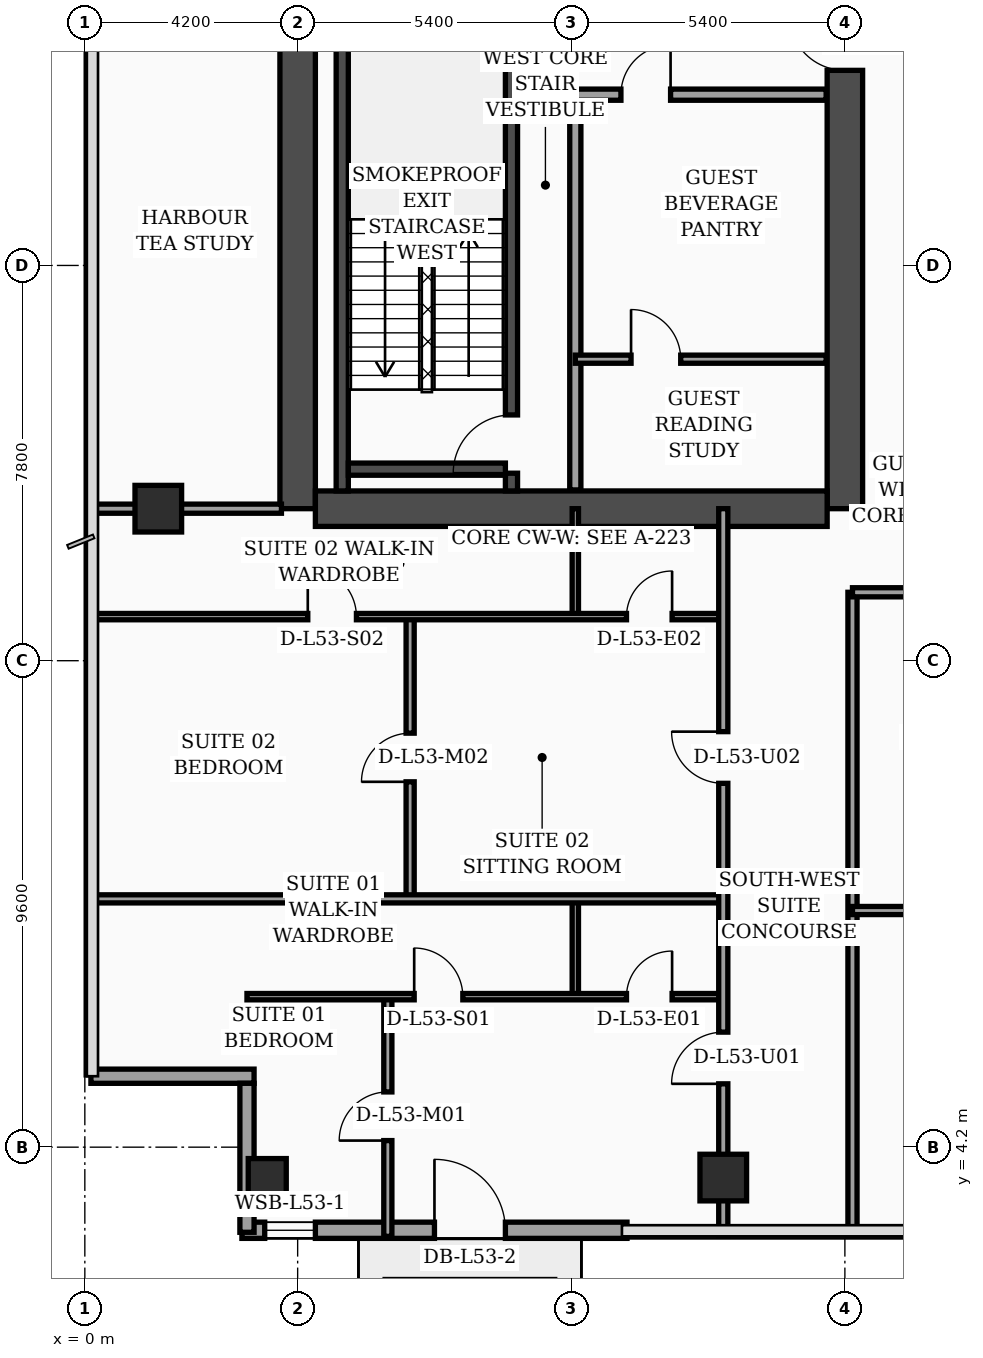
"""IFC4 building model, lengths in metres.
Left out: names, types, materials, properties, quantities, classifications, styles, units other than length and angle.
Written with IfcOpenShell. Run it as: python <this file> out.ifc"""

import sys

from ifc_helpers import new_model, si_unit, direction, frame, frame_2d, origin, origin_2d, place, context, subcontext, project, spatial, rectangle, hollow_rectangle, extrude, element, fill, save


model = new_model("IFC4")
c1 = context("Model", 3, precision=1e-05, world=origin(), true_north=direction((0.0, 1.0)))
c2 = subcontext(c1, "Body", "Model", "MODEL_VIEW")
j1 = project(units=[si_unit("LENGTHUNIT", "METRE"), si_unit("PLANEANGLEUNIT", "RADIAN")], contexts=[c1])
p1 = place(None, origin())
s1 = spatial("IfcSite", under=j1, at=p1, CompositionType="ELEMENT")
p2 = place(p1, origin())
s2 = spatial("IfcBuilding", under=s1, at=p2, CompositionType="ELEMENT")
p3 = place(p2, frame((0.0, 0.0, 214.8)))
s3 = spatial("IfcBuildingStorey", under=s2, at=p3, CompositionType="ELEMENT", Elevation=214.8)
p4 = place(p3, frame((4.2, 16.8, 0.0), z_axis=(0.0, 0.0, 1.0), x_axis=(0.0, 1.0, 0.0)))
e1 = element("IfcWall", 1, at=p4, inside=s3, PredefinedType="SHEAR", context=c2, shape_type="SweptSolid", body=[
    extrude(rectangle(XDim=21.6, YDim=0.7, at=frame_2d((10.8, 0.0))), origin(), (0.0, 0.0, 1.0), 4.05),
])
p5 = place(p3, frame((15.0, 16.8, 0.0), z_axis=(0.0, 0.0, 1.0), x_axis=(0.0, 1.0, 0.0)))
e2 = element("IfcWall", 2, at=p5, inside=s3, PredefinedType="SHEAR", context=c2, shape_type="SweptSolid", body=[
    extrude(rectangle(XDim=21.6, YDim=0.7, at=frame_2d((10.8, 0.0))), origin(), (0.0, 0.0, 1.0), 4.05),
])
p6 = place(p5, frame((8.65, 0.0, 0.0)))
e3 = element("IfcOpeningElement", 3, at=p6, cuts=e2, PredefinedType="OPENING", context=c2, shape_type="SweptSolid", body=[
    extrude(rectangle(XDim=1.1, YDim=2.2, at=frame_2d((0.55, 1.1))), frame((0.0, 0.36, 0.0), z_axis=(0.0, -1.0, 0.0), x_axis=(1.0, 0.0, 0.0)), (0.0, 0.0, 1.0), 0.72),
])
p7 = place(p5, frame((10.85, 0.0, 0.0)))
e4 = element("IfcOpeningElement", 4, at=p7, cuts=e2, PredefinedType="OPENING", context=c2, shape_type="SweptSolid", body=[
    extrude(rectangle(XDim=1.1, YDim=2.2, at=frame_2d((0.55, 1.1))), frame((0.0, 0.36, 0.0), z_axis=(0.0, -1.0, 0.0), x_axis=(1.0, 0.0, 0.0)), (0.0, 0.0, 1.0), 0.72),
])
p8 = place(p5, frame((13.5, 0.0, 0.0)))
e5 = element("IfcOpeningElement", 5, at=p8, cuts=e2, PredefinedType="OPENING", context=c2, shape_type="SweptSolid", body=[
    extrude(rectangle(XDim=1.1, YDim=2.2, at=frame_2d((0.55, 1.1))), frame((0.0, 0.36, 0.0), z_axis=(0.0, -1.0, 0.0), x_axis=(1.0, 0.0, 0.0)), (0.0, 0.0, 1.0), 0.72),
])
p9 = place(p5, frame((16.15, 0.0, 0.0)))
e6 = element("IfcOpeningElement", 6, at=p9, cuts=e2, PredefinedType="OPENING", context=c2, shape_type="SweptSolid", body=[
    extrude(rectangle(XDim=1.1, YDim=2.2, at=frame_2d((0.55, 1.1))), frame((0.0, 0.36, 0.0), z_axis=(0.0, -1.0, 0.0), x_axis=(1.0, 0.0, 0.0)), (0.0, 0.0, 1.0), 0.72),
])
p10 = place(p3, frame((4.55, 16.8, 0.0), z_axis=(0.0, 0.0, 1.0), x_axis=(1.0, 0.0, 0.0)))
e7 = element("IfcWall", 7, at=p10, inside=s3, PredefinedType="SHEAR", context=c2, shape_type="SweptSolid", body=[
    extrude(rectangle(XDim=10.1, YDim=0.7, at=frame_2d((5.05, 0.0))), origin(), (0.0, 0.0, 1.0), 4.05),
])
p11 = place(p3, frame((5.08, 17.15, 0.0), z_axis=(0.0, 0.0, 1.0), x_axis=(0.0, 1.0, 0.0)))
e8 = element("IfcWall", 8, at=p11, inside=s3, PredefinedType="SOLIDWALL", context=c2, shape_type="SweptSolid", body=[
    extrude(rectangle(XDim=9.64, YDim=0.24, at=frame_2d((4.82, 0.0))), origin(), (0.0, 0.0, 1.0), 4.05),
])
p12 = place(p3, frame((8.42, 17.15, 0.0), z_axis=(0.0, 0.0, 1.0), x_axis=(0.0, 1.0, 0.0)))
e9 = element("IfcWall", 9, at=p12, inside=s3, PredefinedType="SOLIDWALL", context=c2, shape_type="SweptSolid", body=[
    extrude(rectangle(XDim=9.64, YDim=0.24, at=frame_2d((4.82, 0.0))), origin(), (0.0, 0.0, 1.0), 4.05),
])
p13 = place(p12, frame((0.35, 0.0, 0.0)))
e10 = element("IfcOpeningElement", 10, at=p13, cuts=e9, PredefinedType="OPENING", context=c2, shape_type="SweptSolid", body=[
    extrude(rectangle(XDim=1.15, YDim=2.2, at=frame_2d((0.575, 1.1))), frame((0.0, 0.13, 0.0), z_axis=(0.0, -1.0, 0.0), x_axis=(1.0, 0.0, 0.0)), (0.0, 0.0, 1.0), 0.26),
])
p14 = place(p3, frame((5.2, 17.58, 0.0), z_axis=(0.0, 0.0, 1.0), x_axis=(1.0, 0.0, 0.0)))
e11 = element("IfcWall", 11, at=p14, inside=s3, PredefinedType="SOLIDWALL", context=c2, shape_type="SweptSolid", body=[
    extrude(rectangle(XDim=3.1, YDim=0.24, at=frame_2d((1.55, 0.0))), origin(), (0.0, 0.0, 1.0), 4.05),
])
p15 = place(p3, frame((3.6, 3.6, 0.0), z_axis=(0.0, 0.0, 1.0), x_axis=(1.0, 0.0, 0.0)))
e12 = element("IfcColumn", 12, at=p15, inside=s3, PredefinedType="COLUMN", context=c2, shape_type="SweptSolid", body=[
    extrude(hollow_rectangle(XDim=0.75, YDim=0.75, WallThickness=0.032, at=origin_2d()), origin(), (0.0, 0.0, 1.0), 4.05),
])
for number, where, z_axis, x_axis in (
    (13, (1.45, 16.8, 0.0), (0.0, 0.0, 1.0), (1.0, 0.0, 0.0)),
    (14, (12.6, 3.6, 0.0), (0.0, 0.0, 1.0), (1.0, 0.0, 0.0)),
):
    element("IfcColumn", number, at=place(p3, frame(where, z_axis=z_axis, x_axis=x_axis)), inside=s3, PredefinedType="COLUMN", context=c2, shape_type="SweptSolid", body=[
        extrude(rectangle(XDim=0.92, YDim=0.92, at=origin_2d()), origin(), (0.0, 0.0, 1.0), 4.05),
    ])
p16 = place(p3, frame((3.1, 2.56, 0.0), z_axis=(0.0, 0.0, 1.0), x_axis=(1.0, 0.0, 0.0)))
e15 = element("IfcWall", 15, at=p16, inside=s3, PredefinedType="SOLIDWALL", context=c2, shape_type="SweptSolid", body=[
    extrude(rectangle(XDim=7.6, YDim=0.32, at=frame_2d((3.8, 0.0))), origin(), (0.0, 0.0, 1.0), 4.05),
])
p17 = place(p16, frame((0.45, 0.0, 0.75)))
e16 = element("IfcOpeningElement", 16, at=p17, cuts=e15, PredefinedType="OPENING", context=c2, shape_type="SweptSolid", body=[
    extrude(rectangle(XDim=1.0, YDim=1.6, at=frame_2d((0.5, 0.8))), frame((0.0, 0.17, 0.0), z_axis=(0.0, -1.0, 0.0), x_axis=(1.0, 0.0, 0.0)), (0.0, 0.0, 1.0), 0.34),
])
p18 = place(p16, frame((3.8, 0.0, 0.0)))
e17 = element("IfcOpeningElement", 17, at=p18, cuts=e15, PredefinedType="OPENING", context=c2, shape_type="SweptSolid", body=[
    extrude(rectangle(XDim=1.4, YDim=2.25, at=frame_2d((0.7, 1.125))), frame((0.0, 0.17, 0.0), z_axis=(0.0, -1.0, 0.0), x_axis=(1.0, 0.0, 0.0)), (0.0, 0.0, 1.0), 0.34),
])
p19 = place(p3, frame((0.12, 5.6, 0.0), z_axis=(0.0, 0.0, 1.0), x_axis=(1.0, 0.0, 0.0)))
e18 = element("IfcWall", 18, at=p19, inside=s3, PredefinedType="SOLIDWALL", context=c2, shape_type="SweptSolid", body=[
    extrude(rectangle(XDim=3.22, YDim=0.28, at=frame_2d((1.61, 0.0))), origin(), (0.0, 0.0, 1.0), 3.45),
])
p20 = place(p3, frame((3.2, 5.46, 0.0), z_axis=(0.0, 0.0, 1.0), x_axis=(0.0, -1.0, 0.0)))
e19 = element("IfcWall", 19, at=p20, inside=s3, PredefinedType="SOLIDWALL", context=c2, shape_type="SweptSolid", body=[
    extrude(rectangle(XDim=2.94, YDim=0.28, at=frame_2d((1.47, 0.0))), origin(), (0.0, 0.0, 1.0), 2.35),
])
p21 = place(p3, frame((9.68, 17.17, 0.0), z_axis=(0.0, 0.0, 1.0), x_axis=(0.0, 1.0, 0.0)))
e20 = element("IfcWall", 20, at=p21, inside=s3, PredefinedType="SOLIDWALL", context=c2, shape_type="SweptSolid", body=[
    extrude(rectangle(XDim=7.83, YDim=0.22, at=frame_2d((3.915, 0.0))), origin(), (0.0, 0.0, 1.0), 4.05),
])
p22 = place(p3, frame((9.68, 19.75, 0.0), z_axis=(0.0, 0.0, 1.0), x_axis=(1.0, 0.0, 0.0)))
e21 = element("IfcWall", 21, at=p22, inside=s3, PredefinedType="PARTITIONING", context=c2, shape_type="SweptSolid", body=[
    extrude(rectangle(XDim=4.95, YDim=0.16, at=frame_2d((2.475, 0.0))), origin(), (0.0, 0.0, 1.0), 4.05),
])
p23 = place(p22, frame((1.1, 0.0, 0.0)))
e22 = element("IfcOpeningElement", 22, at=p23, cuts=e21, PredefinedType="OPENING", context=c2, shape_type="SweptSolid", body=[
    extrude(rectangle(XDim=0.98, YDim=2.15, at=frame_2d((0.49, 1.075))), frame((0.0, 0.09, 0.0), z_axis=(0.0, -1.0, 0.0), x_axis=(1.0, 0.0, 0.0)), (0.0, 0.0, 1.0), 0.18),
])
p24 = place(p3, frame((9.68, 24.97, 0.0), z_axis=(0.0, 0.0, 1.0), x_axis=(1.0, 0.0, 0.0)))
e23 = element("IfcWall", 23, at=p24, inside=s3, PredefinedType="SOLIDWALL", context=c2, shape_type="SweptSolid", body=[
    extrude(rectangle(XDim=4.95, YDim=0.22, at=frame_2d((2.475, 0.0))), origin(), (0.0, 0.0, 1.0), 3.45),
])
p25 = place(p24, frame((0.9, 0.0, 0.0)))
e24 = element("IfcOpeningElement", 24, at=p25, cuts=e23, PredefinedType="OPENING", context=c2, shape_type="SweptSolid", body=[
    extrude(rectangle(XDim=0.98, YDim=2.15, at=frame_2d((0.49, 1.075))), frame((0.0, 0.12, 0.0), z_axis=(0.0, -1.0, 0.0), x_axis=(1.0, 0.0, 0.0)), (0.0, 0.0, 1.0), 0.24),
])
p26 = place(p3, frame((0.08, 16.8, 0.0), z_axis=(0.0, 0.0, 1.0), x_axis=(1.0, 0.0, 0.0)))
e25 = element("IfcWall", 25, at=p26, inside=s3, PredefinedType="PARTITIONING", context=c2, shape_type="SweptSolid", body=[
    extrude(rectangle(XDim=3.8, YDim=0.18, at=frame_2d((1.9, 0.0))), origin(), (0.0, 0.0, 1.0), 3.45),
])
p27 = place(p3, frame((9.68, 7.17, 0.0), z_axis=(0.0, 0.0, 1.0), x_axis=(0.0, 1.0, 0.0)))
e26 = element("IfcWall", 26, at=p27, inside=s3, PredefinedType="PARTITIONING", context=c2, shape_type="SweptSolid", body=[
    extrude(rectangle(XDim=1.93, YDim=0.125, at=frame_2d((0.965, 0.0))), origin(), (0.0, 0.0, 1.0), 3.6),
])
p28 = place(p3, frame((5.98, 2.44, 0.0), z_axis=(0.0, 0.0, 1.0), x_axis=(0.0, 1.0, 0.0)))
e27 = element("IfcWall", 27, at=p28, inside=s3, PredefinedType="PARTITIONING", context=c2, shape_type="SweptSolid", body=[
    extrude(rectangle(XDim=4.73, YDim=0.16, at=frame_2d((2.365, 0.0))), origin(), (0.0, 0.0, 1.0), 2.35),
])
p29 = place(p28, frame((1.89, 0.0, 0.0)))
e28 = element("IfcOpeningElement", 28, at=p29, cuts=e27, PredefinedType="OPENING", context=c2, shape_type="SweptSolid", body=[
    extrude(rectangle(XDim=0.96, YDim=2.2, at=frame_2d((0.48, 1.1))), frame((0.0, 0.09, 0.0), z_axis=(0.0, -1.0, 0.0), x_axis=(1.0, 0.0, 0.0)), (0.0, 0.0, 1.0), 0.18),
])
p30 = place(p3, frame((3.2, 7.17, 0.0), z_axis=(0.0, 0.0, 1.0), x_axis=(1.0, 0.0, 0.0)))
e29 = element("IfcWall", 29, at=p30, inside=s3, PredefinedType="PARTITIONING", context=c2, shape_type="SweptSolid", body=[
    extrude(rectangle(XDim=9.4, YDim=0.125, at=frame_2d((4.7, 0.0))), origin(), (0.0, 0.0, 1.0), 3.45),
])
p31 = place(p30, frame((3.3, 0.0, 0.0)))
e30 = element("IfcOpeningElement", 30, at=p31, cuts=e29, PredefinedType="OPENING", context=c2, shape_type="SweptSolid", body=[
    extrude(rectangle(XDim=0.96, YDim=2.2, at=frame_2d((0.48, 1.1))), frame((0.0, 0.073, 0.0), z_axis=(0.0, -1.0, 0.0), x_axis=(1.0, 0.0, 0.0)), (0.0, 0.0, 1.0), 0.145),
])
p32 = place(p30, frame((7.49, 0.0, 0.0)))
e31 = element("IfcOpeningElement", 31, at=p32, cuts=e29, PredefinedType="OPENING", context=c2, shape_type="SweptSolid", body=[
    extrude(rectangle(XDim=0.9, YDim=2.15, at=frame_2d((0.45, 1.075))), frame((0.0, 0.073, 0.0), z_axis=(0.0, -1.0, 0.0), x_axis=(1.0, 0.0, 0.0)), (0.0, 0.0, 1.0), 0.145),
])
p33 = place(p3, frame((9.68, 14.67, 0.0), z_axis=(0.0, 0.0, 1.0), x_axis=(0.0, 1.0, 0.0)))
e32 = element("IfcWall", 32, at=p33, inside=s3, PredefinedType="PARTITIONING", context=c2, shape_type="SweptSolid", body=[
    extrude(rectangle(XDim=2.13, YDim=0.125, at=frame_2d((1.065, 0.0))), origin(), (0.0, 0.0, 1.0), 4.05),
])
p34 = place(p3, frame((6.42, 9.1, 0.0), z_axis=(0.0, 0.0, 1.0), x_axis=(0.0, 1.0, 0.0)))
e33 = element("IfcWall", 33, at=p34, inside=s3, PredefinedType="PARTITIONING", context=c2, shape_type="SweptSolid", body=[
    extrude(rectangle(XDim=5.57, YDim=0.16, at=frame_2d((2.785, 0.0))), origin(), (0.0, 0.0, 1.0), 3.65),
])
p35 = place(p34, frame((2.31, 0.0, 0.0)))
e34 = element("IfcOpeningElement", 34, at=p35, cuts=e33, PredefinedType="OPENING", context=c2, shape_type="SweptSolid", body=[
    extrude(rectangle(XDim=0.96, YDim=2.2, at=frame_2d((0.48, 1.1))), frame((0.0, 0.09, 0.0), z_axis=(0.0, -1.0, 0.0), x_axis=(1.0, 0.0, 0.0)), (0.0, 0.0, 1.0), 0.18),
])
p36 = place(p3, frame((0.08, 14.67, 0.0), z_axis=(0.0, 0.0, 1.0), x_axis=(1.0, 0.0, 0.0)))
e35 = element("IfcWall", 35, at=p36, inside=s3, PredefinedType="PARTITIONING", context=c2, shape_type="SweptSolid", body=[
    extrude(rectangle(XDim=12.52, YDim=0.125, at=frame_2d((6.26, 0.0))), origin(), (0.0, 0.0, 1.0), 3.45),
])
p37 = place(p36, frame((4.32, 0.0, 0.0)))
e36 = element("IfcOpeningElement", 36, at=p37, cuts=e35, PredefinedType="OPENING", context=c2, shape_type="SweptSolid", body=[
    extrude(rectangle(XDim=0.96, YDim=2.2, at=frame_2d((0.48, 1.1))), frame((0.0, 0.073, 0.0), z_axis=(0.0, -1.0, 0.0), x_axis=(1.0, 0.0, 0.0)), (0.0, 0.0, 1.0), 0.145),
])
p38 = place(p36, frame((10.61, 0.0, 0.0)))
e37 = element("IfcOpeningElement", 37, at=p38, cuts=e35, PredefinedType="OPENING", context=c2, shape_type="SweptSolid", body=[
    extrude(rectangle(XDim=0.9, YDim=2.15, at=frame_2d((0.45, 1.075))), frame((0.0, 0.073, 0.0), z_axis=(0.0, -1.0, 0.0), x_axis=(1.0, 0.0, 0.0)), (0.0, 0.0, 1.0), 0.145),
])
p39 = place(p3, frame((0.08, 9.1, 0.0), z_axis=(0.0, 0.0, 1.0), x_axis=(1.0, 0.0, 0.0)))
e38 = element("IfcWall", 38, at=p39, inside=s3, PredefinedType="PARTITIONING", context=c2, shape_type="SweptSolid", body=[
    extrude(rectangle(XDim=12.52, YDim=0.16, at=frame_2d((6.26, 0.0))), origin(), (0.0, 0.0, 1.0), 3.45),
])
p40 = place(p3, frame((12.6, 2.44, 0.0), z_axis=(0.0, 0.0, 1.0), x_axis=(0.0, 1.0, 0.0)))
e39 = element("IfcWall", 39, at=p40, inside=s3, PredefinedType="PARTITIONING", context=c2, shape_type="SweptSolid", body=[
    extrude(rectangle(XDim=14.36, YDim=0.18, at=frame_2d((7.18, 0.0))), origin(), (0.0, 0.0, 1.0), 2.35),
])
p41 = place(p40, frame((3.01, 0.0, 0.0)))
e40 = element("IfcOpeningElement", 40, at=p41, cuts=e39, PredefinedType="OPENING", context=c2, shape_type="SweptSolid", body=[
    extrude(rectangle(XDim=1.02, YDim=2.2, at=frame_2d((0.51, 1.1))), frame((0.0, 0.1, 0.0), z_axis=(0.0, -1.0, 0.0), x_axis=(1.0, 0.0, 0.0)), (0.0, 0.0, 1.0), 0.2),
])
p42 = place(p40, frame((8.94, 0.0, 0.0)))
e41 = element("IfcOpeningElement", 41, at=p42, cuts=e39, PredefinedType="OPENING", context=c2, shape_type="SweptSolid", body=[
    extrude(rectangle(XDim=1.02, YDim=2.2, at=frame_2d((0.51, 1.1))), frame((0.0, 0.1, 0.0), z_axis=(0.0, -1.0, 0.0), x_axis=(1.0, 0.0, 0.0)), (0.0, 0.0, 1.0), 0.2),
])
p43 = place(p3, frame((15.15, 2.44, 0.0), z_axis=(0.0, 0.0, 1.0), x_axis=(0.0, 1.0, 0.0)))
e42 = element("IfcWall", 42, at=p43, inside=s3, PredefinedType="PARTITIONING", context=c2, shape_type="SweptSolid", body=[
    extrude(rectangle(XDim=12.71, YDim=0.18, at=frame_2d((6.355, 0.0))), origin(), (0.0, 0.0, 1.0), 2.35),
])
p44 = place(p3, frame((15.15, 8.87, 0.0), z_axis=(0.0, 0.0, 1.0), x_axis=(1.0, 0.0, 0.0)))
e43 = element("IfcWall", 43, at=p44, inside=s3, PredefinedType="PARTITIONING", context=c2, shape_type="SweptSolid", body=[
    extrude(rectangle(XDim=4.45, YDim=0.16, at=frame_2d((2.225, 0.0))), origin(), (0.0, 0.0, 1.0), 4.05),
])
p45 = place(p44, frame((1.75, 0.0, 0.0)))
e44 = element("IfcOpeningElement", 44, at=p45, cuts=e43, PredefinedType="OPENING", context=c2, shape_type="SweptSolid", body=[
    extrude(rectangle(XDim=0.96, YDim=2.2, at=frame_2d((0.48, 1.1))), frame((0.0, 0.09, 0.0), z_axis=(0.0, -1.0, 0.0), x_axis=(1.0, 0.0, 0.0)), (0.0, 0.0, 1.0), 0.18),
])
p46 = place(p3, frame((15.15, 15.15, 0.0), z_axis=(0.0, 0.0, 1.0), x_axis=(1.0, 0.0, 0.0)))
e45 = element("IfcWall", 45, at=p46, inside=s3, PredefinedType="PARTITIONING", context=c2, shape_type="SweptSolid", body=[
    extrude(rectangle(XDim=6.45, YDim=0.18, at=frame_2d((3.225, 0.0))), origin(), (0.0, 0.0, 1.0), 2.35),
])
p47 = place(p46, frame((1.74, 0.0, 0.0)))
e46 = element("IfcOpeningElement", 46, at=p47, cuts=e45, PredefinedType="OPENING", context=c2, shape_type="SweptSolid", body=[
    extrude(rectangle(XDim=1.02, YDim=2.2, at=frame_2d((0.51, 1.1))), frame((0.0, 0.1, 0.0), z_axis=(0.0, -1.0, 0.0), x_axis=(1.0, 0.0, 0.0)), (0.0, 0.0, 1.0), 0.2),
])
p48 = place(p17, origin())
e47 = element("IfcWindow", 47, at=p48, inside=s3, PartitioningType="SINGLE_PANEL", PredefinedType="WINDOW", context=c2, shape_type="SweptSolid", body=[
    extrude(rectangle(XDim=1.0, YDim=1.6, at=frame_2d((0.5, 0.8))), frame((0.0, 0.03, 0.0), z_axis=(0.0, -1.0, 0.0), x_axis=(1.0, 0.0, 0.0)), (0.0, 0.0, 1.0), 0.06),
])
fill(e16, e47)
p49 = place(p18, origin())
e48 = element("IfcDoor", 48, at=p49, inside=s3, OperationType="SINGLE_SWING_LEFT", PredefinedType="DOOR", context=c2, shape_type="SweptSolid", body=[
    extrude(rectangle(XDim=1.4, YDim=2.25, at=frame_2d((0.7, 1.125))), frame((0.0, 0.025, 0.0), z_axis=(0.0, -1.0, 0.0), x_axis=(1.0, 0.0, 0.0)), (0.0, 0.0, 1.0), 0.05),
])
fill(e17, e48)
p50 = place(p23, origin())
e49 = element("IfcDoor", 49, at=p50, inside=s3, OperationType="SINGLE_SWING_LEFT", PredefinedType="DOOR", context=c2, shape_type="SweptSolid", body=[
    extrude(rectangle(XDim=0.98, YDim=2.15, at=frame_2d((0.49, 1.075))), frame((0.0, 0.025, 0.0), z_axis=(0.0, -1.0, 0.0), x_axis=(1.0, 0.0, 0.0)), (0.0, 0.0, 1.0), 0.05),
])
fill(e22, e49)
p51 = place(p25, origin())
e50 = element("IfcDoor", 50, at=p51, inside=s3, OperationType="SINGLE_SWING_RIGHT", PredefinedType="DOOR", context=c2, shape_type="SweptSolid", body=[
    extrude(rectangle(XDim=0.98, YDim=2.15, at=frame_2d((0.49, 1.075))), frame((0.0, 0.025, 0.0), z_axis=(0.0, -1.0, 0.0), x_axis=(1.0, 0.0, 0.0)), (0.0, 0.0, 1.0), 0.05),
])
fill(e24, e50)
p52 = place(p29, origin())
e51 = element("IfcDoor", 51, at=p52, inside=s3, OperationType="SINGLE_SWING_LEFT", PredefinedType="DOOR", context=c2, shape_type="SweptSolid", body=[
    extrude(rectangle(XDim=0.96, YDim=2.2, at=frame_2d((0.48, 1.1))), frame((0.0, 0.025, 0.0), z_axis=(0.0, -1.0, 0.0), x_axis=(1.0, 0.0, 0.0)), (0.0, 0.0, 1.0), 0.05),
])
fill(e28, e51)
p53 = place(p31, origin())
e52 = element("IfcDoor", 52, at=p53, inside=s3, OperationType="SINGLE_SWING_LEFT", PredefinedType="DOOR", context=c2, shape_type="SweptSolid", body=[
    extrude(rectangle(XDim=0.96, YDim=2.2, at=frame_2d((0.48, 1.1))), frame((0.0, 0.025, 0.0), z_axis=(0.0, -1.0, 0.0), x_axis=(1.0, 0.0, 0.0)), (0.0, 0.0, 1.0), 0.05),
])
fill(e30, e52)
p54 = place(p32, origin())
e53 = element("IfcDoor", 53, at=p54, inside=s3, OperationType="SINGLE_SWING_RIGHT", PredefinedType="DOOR", context=c2, shape_type="SweptSolid", body=[
    extrude(rectangle(XDim=0.9, YDim=2.15, at=frame_2d((0.45, 1.075))), frame((0.0, 0.025, 0.0), z_axis=(0.0, -1.0, 0.0), x_axis=(1.0, 0.0, 0.0)), (0.0, 0.0, 1.0), 0.05),
])
fill(e31, e53)
p55 = place(p35, origin())
e54 = element("IfcDoor", 54, at=p55, inside=s3, OperationType="SINGLE_SWING_LEFT", PredefinedType="DOOR", context=c2, shape_type="SweptSolid", body=[
    extrude(rectangle(XDim=0.96, YDim=2.2, at=frame_2d((0.48, 1.1))), frame((0.0, 0.025, 0.0), z_axis=(0.0, -1.0, 0.0), x_axis=(1.0, 0.0, 0.0)), (0.0, 0.0, 1.0), 0.05),
])
fill(e34, e54)
p56 = place(p37, origin())
e55 = element("IfcDoor", 55, at=p56, inside=s3, OperationType="SINGLE_SWING_LEFT", PredefinedType="DOOR", context=c2, shape_type="SweptSolid", body=[
    extrude(rectangle(XDim=0.96, YDim=2.2, at=frame_2d((0.48, 1.1))), frame((0.0, 0.025, 0.0), z_axis=(0.0, -1.0, 0.0), x_axis=(1.0, 0.0, 0.0)), (0.0, 0.0, 1.0), 0.05),
])
fill(e36, e55)
p57 = place(p38, origin())
e56 = element("IfcDoor", 56, at=p57, inside=s3, OperationType="SINGLE_SWING_RIGHT", PredefinedType="DOOR", context=c2, shape_type="SweptSolid", body=[
    extrude(rectangle(XDim=0.9, YDim=2.15, at=frame_2d((0.45, 1.075))), frame((0.0, 0.025, 0.0), z_axis=(0.0, -1.0, 0.0), x_axis=(1.0, 0.0, 0.0)), (0.0, 0.0, 1.0), 0.05),
])
fill(e37, e56)
p58 = place(p41, origin())
e57 = element("IfcDoor", 57, at=p58, inside=s3, OperationType="SINGLE_SWING_LEFT", PredefinedType="DOOR", context=c2, shape_type="SweptSolid", body=[
    extrude(rectangle(XDim=1.02, YDim=2.2, at=frame_2d((0.51, 1.1))), frame((0.0, 0.025, 0.0), z_axis=(0.0, -1.0, 0.0), x_axis=(1.0, 0.0, 0.0)), (0.0, 0.0, 1.0), 0.05),
])
fill(e40, e57)
p59 = place(p42, origin())
e58 = element("IfcDoor", 58, at=p59, inside=s3, OperationType="SINGLE_SWING_RIGHT", PredefinedType="DOOR", context=c2, shape_type="SweptSolid", body=[
    extrude(rectangle(XDim=1.02, YDim=2.2, at=frame_2d((0.51, 1.1))), frame((0.0, 0.025, 0.0), z_axis=(0.0, -1.0, 0.0), x_axis=(1.0, 0.0, 0.0)), (0.0, 0.0, 1.0), 0.05),
])
fill(e41, e58)
p60 = place(p13, origin())
e59 = element("IfcDoor", 59, at=p60, inside=s3, OperationType="SINGLE_SWING_LEFT", PredefinedType="DOOR", context=c2, shape_type="SweptSolid", body=[
    extrude(rectangle(XDim=1.15, YDim=2.2, at=frame_2d((0.575, 1.1))), frame((0.0, 0.025, 0.0), z_axis=(0.0, -1.0, 0.0), x_axis=(1.0, 0.0, 0.0)), (0.0, 0.0, 1.0), 0.05),
])
fill(e10, e59)
p61 = place(p6, origin())
e60 = element("IfcDoor", 60, at=p61, inside=s3, OperationType="SINGLE_SWING_RIGHT", PredefinedType="DOOR", context=c2, shape_type="SweptSolid", body=[
    extrude(rectangle(XDim=1.1, YDim=2.2, at=frame_2d((0.55, 1.1))), frame((0.0, 0.025, 0.0), z_axis=(0.0, -1.0, 0.0), x_axis=(1.0, 0.0, 0.0)), (0.0, 0.0, 1.0), 0.05),
])
fill(e3, e60)
save(model, sys.argv[1])
